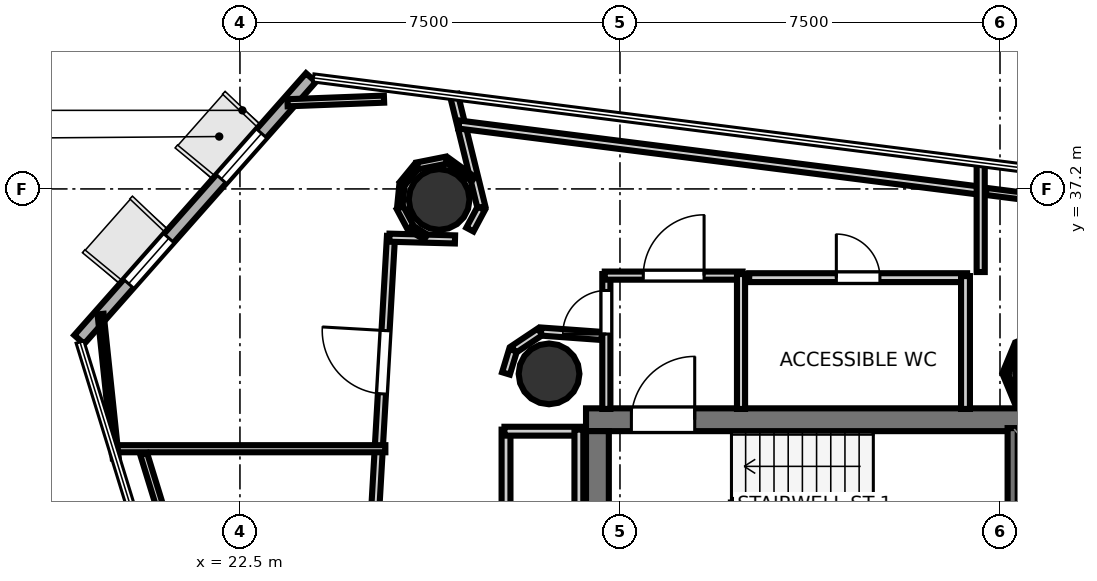
"""IFC4 building model, lengths in metres.
Left out: names, types, materials, properties, quantities, classifications, styles, units other than length and angle.
Written with IfcOpenShell. Run it as: python <this file> out.ifc"""

import sys

from ifc_helpers import new_model, si_unit, direction, frame, frame_2d, origin, origin_2d, place, context, subcontext, project, spatial, rectangle, hollow_circle, extrude, element, fill, save


model = new_model("IFC4")
c1 = context("Model", 3, precision=1e-05, world=origin(), true_north=direction((0.0, 1.0)))
c2 = subcontext(c1, "Body", "Model", "MODEL_VIEW")
j1 = project(units=[si_unit("LENGTHUNIT", "METRE"), si_unit("PLANEANGLEUNIT", "RADIAN")], contexts=[c1])
p1 = place(None, origin())
s1 = spatial("IfcSite", under=j1, at=p1, CompositionType="ELEMENT")
p2 = place(p1, origin())
s2 = spatial("IfcBuilding", under=s1, at=p2, CompositionType="ELEMENT")
p3 = place(p2, frame((0.0, 0.0, 218.8)))
s3 = spatial("IfcBuildingStorey", under=s2, at=p3, CompositionType="ELEMENT", Elevation=218.8)
p4 = place(p3, frame((29.33, 32.645, 0.0), z_axis=(0.0, 0.0, 1.0), x_axis=(1.0, 0.0, 0.0)))
e1 = element("IfcWall", 1, at=p4, inside=s3, PredefinedType="SHEAR", context=c2, shape_type="SweptSolid", body=[
    extrude(rectangle(XDim=10.52, YDim=0.45, at=frame_2d((5.26, 0.0))), origin(), (0.0, 0.0, 1.0), 3.52),
])
p5 = place(p4, frame((0.895, 0.0, 0.0)))
e2 = element("IfcOpeningElement", 2, at=p5, cuts=e1, PredefinedType="OPENING", context=c2, shape_type="SweptSolid", body=[
    extrude(rectangle(XDim=1.25, YDim=2.15, at=frame_2d((0.625, 1.075))), frame((0.0, 0.235, 0.0), z_axis=(0.0, -1.0, 0.0), x_axis=(1.0, 0.0, 0.0)), (0.0, 0.0, 1.0), 0.47),
])
p6 = place(p3, frame((29.555, 24.98, 0.0), z_axis=(0.0, 0.0, 1.0), x_axis=(0.0, 1.0, 0.0)))
e3 = element("IfcWall", 3, at=p6, inside=s3, PredefinedType="SHEAR", context=c2, shape_type="SweptSolid", body=[
    extrude(rectangle(XDim=7.44, YDim=0.45, at=frame_2d((3.72, 0.0))), origin(), (0.0, 0.0, 1.0), 3.52),
])
for number, where, z_axis, x_axis in (
    (4, (28.6, 33.55, 0.0), (0.0, 0.0, 1.0), (1.0, 0.0, 0.0)),
    (5, (38.4, 33.55, 0.0), (0.0, 0.0, 1.0), (1.0, 0.0, 0.0)),
    (6, (26.431, 36.992, 0.0), (0.0, 0.0, 1.0), (1.0, 0.0, 0.0)),
):
    element("IfcColumn", number, at=place(p3, frame(where, z_axis=z_axis, x_axis=x_axis)), inside=s3, PredefinedType="COLUMN", context=c2, shape_type="SweptSolid", body=[
        extrude(hollow_circle(Radius=0.6, WallThickness=0.03, at=origin_2d()), origin(), (0.0, 0.0, 1.0), 3.7),
    ])
p7 = place(p3, frame((23.901, 39.397, 0.0), z_axis=(0.0, 0.0, 1.0), x_axis=(-0.66253953577, -0.74902694447, 0.0)))
e7 = element("IfcWall", 7, at=p7, inside=s3, PredefinedType="SOLIDWALL", context=c2, shape_type="SweptSolid", body=[
    extrude(rectangle(XDim=6.902, YDim=0.26, at=frame_2d((3.451, 0.0))), origin(), (0.0, 0.0, 1.0), 3.52),
])
p8 = place(p7, frame((1.471, 0.0, 0.9)))
e8 = element("IfcOpeningElement", 8, at=p8, cuts=e7, PredefinedType="OPENING", context=c2, shape_type="SweptSolid", body=[
    extrude(rectangle(XDim=1.2, YDim=2.0, at=frame_2d((0.6, 1.0))), frame((0.0, 0.14, 0.0), z_axis=(0.0, -1.0, 0.0), x_axis=(1.0, 0.0, 0.0)), (0.0, 0.0, 1.0), 0.28),
])
p9 = place(p7, frame((4.231, 0.0, 0.9)))
e9 = element("IfcOpeningElement", 9, at=p9, cuts=e7, PredefinedType="OPENING", context=c2, shape_type="SweptSolid", body=[
    extrude(rectangle(XDim=1.2, YDim=2.0, at=frame_2d((0.6, 1.0))), frame((0.0, 0.14, 0.0), z_axis=(0.0, -1.0, 0.0), x_axis=(1.0, 0.0, 0.0)), (0.0, 0.0, 1.0), 0.28),
])
p10 = place(p3, frame((37.75, 30.12, 0.0), z_axis=(0.0, 0.0, 1.0), x_axis=(0.0, 1.0, 0.0)))
e10 = element("IfcWall", 10, at=p10, inside=s3, PredefinedType="SOLIDWALL", context=c2, shape_type="SweptSolid", body=[
    extrude(rectangle(XDim=2.36, YDim=0.2, at=frame_2d((1.18, 0.0))), origin(), (0.0, 0.0, 1.0), 3.52),
])
p11 = place(p3, frame((29.731, 32.858, 0.0), z_axis=(0.0, 0.0, 1.0), x_axis=(0.0, 1.0, 0.0)))
e11 = element("IfcWall", 11, at=p11, inside=s3, PredefinedType="PARTITIONING", context=c2, shape_type="SweptSolid", body=[
    extrude(rectangle(XDim=2.662, YDim=0.16, at=frame_2d((1.331, 0.0))), origin(), (0.0, 0.0, 1.0), 2.84),
])
p12 = place(p11, frame((1.478, 0.0, 0.0)))
e12 = element("IfcOpeningElement", 12, at=p12, cuts=e11, PredefinedType="OPENING", context=c2, shape_type="SweptSolid", body=[
    extrude(rectangle(XDim=0.86, YDim=2.05, at=frame_2d((0.43, 1.025))), frame((0.0, 0.09, 0.0), z_axis=(0.0, -1.0, 0.0), x_axis=(1.0, 0.0, 0.0)), (0.0, 0.0, 1.0), 0.18),
])
p13 = place(p3, frame((29.7, 35.489, 0.0), z_axis=(0.0, 0.0, 1.0), x_axis=(1.0, 0.0, 0.0)))
e13 = element("IfcWall", 13, at=p13, inside=s3, PredefinedType="PARTITIONING", context=c2, shape_type="SweptSolid", body=[
    extrude(rectangle(XDim=2.72, YDim=0.16, at=frame_2d((1.36, 0.0))), origin(), (0.0, 0.0, 1.0), 2.84),
])
p14 = place(p13, frame((0.76, 0.0, 0.0)))
e14 = element("IfcOpeningElement", 14, at=p14, cuts=e13, PredefinedType="OPENING", context=c2, shape_type="SweptSolid", body=[
    extrude(rectangle(XDim=1.2, YDim=2.15, at=frame_2d((0.6, 1.075))), frame((0.0, 0.09, 0.0), z_axis=(0.0, -1.0, 0.0), x_axis=(1.0, 0.0, 0.0)), (0.0, 0.0, 1.0), 0.18),
])
p15 = place(p3, frame((32.389, 35.52, 0.0), z_axis=(0.0, 0.0, 1.0), x_axis=(0.0, -1.0, 0.0)))
e15 = element("IfcWall", 15, at=p15, inside=s3, PredefinedType="PARTITIONING", context=c2, shape_type="SweptSolid", body=[
    extrude(rectangle(XDim=2.662, YDim=0.16, at=frame_2d((1.331, 0.0))), origin(), (0.0, 0.0, 1.0), 2.84),
])
p16 = place(p3, frame((32.55, 35.449, 0.0), z_axis=(0.0, 0.0, 1.0), x_axis=(1.0, 0.0, 0.0)))
e16 = element("IfcWall", 16, at=p16, inside=s3, PredefinedType="PLUMBINGWALL", context=c2, shape_type="SweptSolid", body=[
    extrude(rectangle(XDim=4.3, YDim=0.175, at=frame_2d((2.15, 0.0))), origin(), (0.0, 0.0, 1.0), 2.84),
])
p17 = place(p16, frame((1.72, 0.0, 0.0)))
e17 = element("IfcOpeningElement", 17, at=p17, cuts=e16, PredefinedType="OPENING", context=c2, shape_type="SweptSolid", body=[
    extrude(rectangle(XDim=0.86, YDim=2.05, at=frame_2d((0.43, 1.025))), frame((0.0, 0.097, 0.0), z_axis=(0.0, -1.0, 0.0), x_axis=(1.0, 0.0, 0.0)), (0.0, 0.0, 1.0), 0.195),
])
p18 = place(p3, frame((36.819, 35.48, 0.0), z_axis=(0.0, 0.0, 1.0), x_axis=(0.0, -1.0, 0.0)))
e18 = element("IfcWall", 18, at=p18, inside=s3, PredefinedType="PLUMBINGWALL", context=c2, shape_type="SweptSolid", body=[
    extrude(rectangle(XDim=2.622, YDim=0.175, at=frame_2d((1.311, 0.0))), origin(), (0.0, 0.0, 1.0), 2.84),
])
p19 = place(p3, frame((27.751, 28.48, 0.0), z_axis=(0.0, 0.0, 1.0), x_axis=(0.0, 1.0, 0.0)))
e19 = element("IfcWall", 19, at=p19, inside=s3, PredefinedType="PLUMBINGWALL", context=c2, shape_type="SweptSolid", body=[
    extrude(rectangle(XDim=3.97, YDim=0.175, at=frame_2d((1.985, 0.0))), origin(), (0.0, 0.0, 1.0), 2.84),
])
p20 = place(p19, frame((1.555, 0.0, 0.0)))
e20 = element("IfcOpeningElement", 20, at=p20, cuts=e19, PredefinedType="OPENING", context=c2, shape_type="SweptSolid", body=[
    extrude(rectangle(XDim=0.86, YDim=2.05, at=frame_2d((0.43, 1.025))), frame((0.0, 0.097, 0.0), z_axis=(0.0, -1.0, 0.0), x_axis=(1.0, 0.0, 0.0)), (0.0, 0.0, 1.0), 0.195),
])
p21 = place(p3, frame((27.72, 32.419, 0.0), z_axis=(0.0, 0.0, 1.0), x_axis=(1.0, 0.0, 0.0)))
e21 = element("IfcWall", 21, at=p21, inside=s3, PredefinedType="PLUMBINGWALL", context=c2, shape_type="SweptSolid", body=[
    extrude(rectangle(XDim=1.5, YDim=0.175, at=frame_2d((0.75, 0.0))), origin(), (0.0, 0.0, 1.0), 2.84),
])
p22 = place(p3, frame((29.189, 32.45, 0.0), z_axis=(0.0, 0.0, 1.0), x_axis=(0.0, -1.0, 0.0)))
e22 = element("IfcWall", 22, at=p22, inside=s3, PredefinedType="PLUMBINGWALL", context=c2, shape_type="SweptSolid", body=[
    extrude(rectangle(XDim=3.97, YDim=0.175, at=frame_2d((1.985, 0.0))), origin(), (0.0, 0.0, 1.0), 2.84),
])
p23 = place(p3, frame((27.265, 36.839, 0.0), z_axis=(0.0, 0.0, 1.0), x_axis=(-0.238232940633, 0.971208044652, 0.0)))
e23 = element("IfcWall", 23, at=p23, inside=s3, PredefinedType="PARTITIONING", context=c2, shape_type="SweptSolid", body=[
    extrude(rectangle(XDim=2.284, YDim=0.16, at=frame_2d((1.142, 0.0))), origin(), (0.0, 0.0, 1.0), 2.84),
])
p24 = place(p3, frame((26.822, 38.471, 0.0), z_axis=(0.0, 0.0, 1.0), x_axis=(0.992041870869, -0.12590840497, 0.0)))
e24 = element("IfcWall", 24, at=p24, inside=s3, PredefinedType="PARTITIONING", context=c2, shape_type="SweptSolid", body=[
    extrude(rectangle(XDim=10.407, YDim=0.16, at=frame_2d((5.203, 0.0))), origin(), (0.0, 0.0, 1.0), 2.84),
])
p25 = place(p3, frame((37.119, 37.74, 0.0), z_axis=(0.0, 0.0, 1.0), x_axis=(0.0, -1.0, 0.0)))
e25 = element("IfcWall", 25, at=p25, inside=s3, PredefinedType="PARTITIONING", context=c2, shape_type="SweptSolid", body=[
    extrude(rectangle(XDim=2.179, YDim=0.16, at=frame_2d((1.09, 0.0))), origin(), (0.0, 0.0, 1.0), 2.84),
])
p26 = place(p3, frame((29.64, 34.299, 0.0), z_axis=(0.0, 0.0, 1.0), x_axis=(-0.997392224386, 0.072171675429, 0.0)))
e26 = element("IfcWall", 26, at=p26, inside=s3, PredefinedType="PARTITIONING", context=c2, shape_type="SweptSolid", body=[
    extrude(rectangle(XDim=1.201, YDim=0.16, at=frame_2d((0.601, 0.0))), origin(), (0.0, 0.0, 1.0), 2.84),
])
p27 = place(p3, frame((28.423, 34.38, 0.0), z_axis=(0.0, 0.0, 1.0), x_axis=(-0.831571279003, -0.555418047903, 0.0)))
e27 = element("IfcWall", 27, at=p27, inside=s3, PredefinedType="PARTITIONING", context=c2, shape_type="SweptSolid", body=[
    extrude(rectangle(XDim=0.628, YDim=0.16, at=frame_2d((0.314, 0.0))), origin(), (0.0, 0.0, 1.0), 2.84),
])
p28 = place(p3, frame((27.888, 34.015, 0.0), z_axis=(0.0, 0.0, 1.0), x_axis=(-0.290263585829, -0.956946733492, 0.0)))
e28 = element("IfcWall", 28, at=p28, inside=s3, PredefinedType="PARTITIONING", context=c2, shape_type="SweptSolid", body=[
    extrude(rectangle(XDim=0.476, YDim=0.16, at=frame_2d((0.238, 0.0))), origin(), (0.0, 0.0, 1.0), 2.84),
])
p29 = place(p3, frame((24.413, 17.721, 0.0), z_axis=(0.0, 0.0, 1.0), x_axis=(0.057505607696, 0.998345183333, 0.0)))
e29 = element("IfcWall", 29, at=p29, inside=s3, PredefinedType="PARTITIONING", context=c2, shape_type="SweptSolid", body=[
    extrude(rectangle(XDim=18.578, YDim=0.16, at=frame_2d((9.289, 0.0))), origin(), (0.0, 0.0, 1.0), 2.84),
])
p30 = place(p29, frame((15.461, 0.0, 0.0)))
e30 = element("IfcOpeningElement", 30, at=p30, cuts=e29, PredefinedType="OPENING", context=c2, shape_type="SweptSolid", body=[
    extrude(rectangle(XDim=1.25, YDim=2.2, at=frame_2d((0.625, 1.1))), frame((0.0, 0.09, 0.0), z_axis=(0.0, -1.0, 0.0), x_axis=(1.0, 0.0, 0.0)), (0.0, 0.0, 1.0), 0.18),
])
p31 = place(p29, frame((12.002, 0.0, 0.0)))
e31 = element("IfcOpeningElement", 31, at=p31, cuts=e29, PredefinedType="OPENING", context=c2, shape_type="SweptSolid", body=[
    extrude(rectangle(XDim=1.25, YDim=2.2, at=frame_2d((0.625, 1.1))), frame((0.0, 0.09, 0.0), z_axis=(0.0, -1.0, 0.0), x_axis=(1.0, 0.0, 0.0)), (0.0, 0.0, 1.0), 0.18),
])
p32 = place(p3, frame((25.449, 36.238, 0.0), z_axis=(0.0, 0.0, 1.0), x_axis=(0.999651698073, -0.026390955635, 0.0)))
e32 = element("IfcWall", 32, at=p32, inside=s3, PredefinedType="PARTITIONING", context=c2, shape_type="SweptSolid", body=[
    extrude(rectangle(XDim=1.295, YDim=0.16, at=frame_2d((0.647, 0.0))), origin(), (0.0, 0.0, 1.0), 2.84),
])
p33 = place(p3, frame((27.038, 36.398, 0.0), z_axis=(0.0, 0.0, 1.0), x_axis=(0.471865548338, 0.881670519123, 0.0)))
e33 = element("IfcWall", 33, at=p33, inside=s3, PredefinedType="PARTITIONING", context=c2, shape_type="SweptSolid", body=[
    extrude(rectangle(XDim=0.476, YDim=0.16, at=frame_2d((0.238, 0.0))), origin(), (0.0, 0.0, 1.0), 2.84),
])
p34 = place(p3, frame((38.388, 34.339, 0.0), z_axis=(0.0, 0.0, 1.0), x_axis=(-0.923894108428, -0.382648241093, 0.0)))
e34 = element("IfcWall", 34, at=p34, inside=s3, PredefinedType="PARTITIONING", context=c2, shape_type="SweptSolid", body=[
    extrude(rectangle(XDim=0.582, YDim=0.14, at=frame_2d((0.291, 0.0))), origin(), (0.0, 0.0, 1.0), 2.84),
])
p35 = place(p3, frame((37.834, 34.099, 0.0), z_axis=(0.0, 0.0, 1.0), x_axis=(-0.382796622927, -0.923832639322, 0.0)))
e35 = element("IfcWall", 35, at=p35, inside=s3, PredefinedType="PARTITIONING", context=c2, shape_type="SweptSolid", body=[
    extrude(rectangle(XDim=0.582, YDim=0.12, at=frame_2d((0.291, 0.0))), origin(), (0.0, 0.0, 1.0), 2.84),
])
p36 = place(p3, frame((37.611, 33.538, 0.0), z_axis=(0.0, 0.0, 1.0), x_axis=(0.382796622927, -0.923832639322, 0.0)))
e36 = element("IfcWall", 36, at=p36, inside=s3, PredefinedType="PARTITIONING", context=c2, shape_type="SweptSolid", body=[
    extrude(rectangle(XDim=0.582, YDim=0.105, at=frame_2d((0.291, 0.0))), origin(), (0.0, 0.0, 1.0), 2.84),
])
p37 = place(p3, frame((37.851, 32.984, 0.0), z_axis=(0.0, 0.0, 1.0), x_axis=(0.924628481531, -0.380870281252, 0.0)))
e37 = element("IfcWall", 37, at=p37, inside=s3, PredefinedType="PARTITIONING", context=c2, shape_type="SweptSolid", body=[
    extrude(rectangle(XDim=0.102, YDim=0.14, at=frame_2d((0.051, 0.0))), origin(), (0.0, 0.0, 1.0), 2.84),
])
p38 = place(p3, frame((37.226, 37.15, 0.0), z_axis=(0.0, 0.0, 1.0), x_axis=(0.992042774502, -0.125901284976, 0.0)))
e38 = element("IfcWall", 38, at=p38, inside=s3, PredefinedType="PARTITIONING", context=c2, shape_type="SweptSolid", body=[
    extrude(rectangle(XDim=8.885, YDim=0.14, at=frame_2d((4.443, 0.0))), origin(), (0.0, 0.0, 1.0), 2.84),
])
p39 = place(p3, frame((27.105, 37.394, 0.0), z_axis=(0.0, 0.0, 1.0), x_axis=(-0.809610443394, 0.586967571461, 0.0)))
e39 = element("IfcWall", 39, at=p39, inside=s3, PredefinedType="PARTITIONING", context=c2, shape_type="SweptSolid", body=[
    extrude(rectangle(XDim=0.627, YDim=0.105, at=frame_2d((0.313, 0.0))), origin(), (0.0, 0.0, 1.0), 2.84),
])
p40 = place(p3, frame((26.573, 37.768, 0.0), z_axis=(0.0, 0.0, 1.0), x_axis=(-0.980773892286, -0.195147565217, 0.0)))
e40 = element("IfcWall", 40, at=p40, inside=s3, PredefinedType="PARTITIONING", context=c2, shape_type="SweptSolid", body=[
    extrude(rectangle(XDim=0.582, YDim=0.14, at=frame_2d((0.291, 0.0))), origin(), (0.0, 0.0, 1.0), 2.84),
])
p41 = place(p3, frame((25.985, 37.644, 0.0), z_axis=(0.0, 0.0, 1.0), x_axis=(-0.634562438402, -0.772871601088, 0.0)))
e41 = element("IfcWall", 41, at=p41, inside=s3, PredefinedType="PARTITIONING", context=c2, shape_type="SweptSolid", body=[
    extrude(rectangle(XDim=0.441, YDim=0.12, at=frame_2d((0.221, 0.0))), origin(), (0.0, 0.0, 1.0), 2.84),
])
p42 = place(p3, frame((25.698, 37.286, 0.0), z_axis=(0.0, 0.0, 1.0), x_axis=(-0.097915215421, -0.995194760129, 0.0)))
e42 = element("IfcWall", 42, at=p42, inside=s3, PredefinedType="PARTITIONING", context=c2, shape_type="SweptSolid", body=[
    extrude(rectangle(XDim=0.441, YDim=0.105, at=frame_2d((0.221, 0.0))), origin(), (0.0, 0.0, 1.0), 2.84),
])
p43 = place(p3, frame((25.658, 36.829, 0.0), z_axis=(0.0, 0.0, 1.0), x_axis=(0.471392110461, -0.881923737177, 0.0)))
e43 = element("IfcWall", 43, at=p43, inside=s3, PredefinedType="PARTITIONING", context=c2, shape_type="SweptSolid", body=[
    extrude(rectangle(XDim=0.441, YDim=0.14, at=frame_2d((0.221, 0.0))), origin(), (0.0, 0.0, 1.0), 2.84),
])
p44 = place(p3, frame((25.877, 36.428, 0.0), z_axis=(0.0, 0.0, 1.0), x_axis=(0.852322728649, -0.523016219853, 0.0)))
e44 = element("IfcWall", 44, at=p44, inside=s3, PredefinedType="PARTITIONING", context=c2, shape_type="SweptSolid", body=[
    extrude(rectangle(XDim=0.34, YDim=0.12, at=frame_2d((0.17, 0.0))), origin(), (0.0, 0.0, 1.0), 2.84),
])
p45 = place(p3, frame((25.37, 32.073, 0.0), z_axis=(0.0, 0.0, 1.0), x_axis=(-1.0, 0.0, 0.0)))
e45 = element("IfcWall", 45, at=p45, inside=s3, PredefinedType="PARTITIONING", context=c2, shape_type="SweptSolid", body=[
    extrude(rectangle(XDim=5.398, YDim=0.14, at=frame_2d((2.699, 0.0))), origin(), (0.0, 0.0, 1.0), 2.84),
])
p46 = place(p3, frame((20.048, 31.889, 0.0), z_axis=(0.0, 0.0, 1.0), x_axis=(-0.104435651057, 0.994531645946, 0.0)))
e46 = element("IfcWall", 46, at=p46, inside=s3, PredefinedType="PARTITIONING", context=c2, shape_type="SweptSolid", body=[
    extrude(rectangle(XDim=2.857, YDim=0.12, at=frame_2d((1.428, 0.0))), origin(), (0.0, 0.0, 1.0), 2.84),
])
p47 = place(p3, frame((23.439, 38.9, 0.0), z_axis=(0.0, 0.0, 1.0), x_axis=(0.999290219192, 0.037670383952, 0.0)))
e47 = element("IfcWall", 47, at=p47, inside=s3, PredefinedType="PARTITIONING", context=c2, shape_type="SweptSolid", body=[
    extrude(rectangle(XDim=1.906, YDim=0.14, at=frame_2d((0.953, 0.0))), origin(), (0.0, 0.0, 1.0), 2.84),
])
p48 = place(p3, frame((22.639, 25.351, 0.0), z_axis=(0.0, 0.0, 1.0), x_axis=(-0.29437082852, 0.955691276154, 0.0)))
e48 = element("IfcWall", 48, at=p48, inside=s3, PredefinedType="PARTITIONING", context=c2, shape_type="SweptSolid", body=[
    extrude(rectangle(XDim=6.923, YDim=0.14, at=frame_2d((3.461, 0.0))), origin(), (0.0, 0.0, 1.0), 2.84),
])
p49 = place(p5, origin())
e49 = element("IfcDoor", 49, at=p49, inside=s3, OperationType="SINGLE_SWING_RIGHT", PredefinedType="DOOR", context=c2, shape_type="SweptSolid", body=[
    extrude(rectangle(XDim=1.25, YDim=2.15, at=frame_2d((0.625, 1.075))), frame((0.0, 0.025, 0.0), z_axis=(0.0, -1.0, 0.0), x_axis=(1.0, 0.0, 0.0)), (0.0, 0.0, 1.0), 0.05),
])
fill(e2, e49)
p50 = place(p14, origin())
e50 = element("IfcDoor", 50, at=p50, inside=s3, OperationType="SINGLE_SWING_RIGHT", PredefinedType="DOOR", context=c2, shape_type="SweptSolid", body=[
    extrude(rectangle(XDim=1.2, YDim=2.15, at=frame_2d((0.6, 1.075))), frame((0.0, 0.025, 0.0), z_axis=(0.0, -1.0, 0.0), x_axis=(1.0, 0.0, 0.0)), (0.0, 0.0, 1.0), 0.05),
])
fill(e14, e50)
p51 = place(p17, origin())
e51 = element("IfcDoor", 51, at=p51, inside=s3, OperationType="SINGLE_SWING_LEFT", PredefinedType="DOOR", context=c2, shape_type="SweptSolid", body=[
    extrude(rectangle(XDim=0.86, YDim=2.05, at=frame_2d((0.43, 1.025))), frame((0.0, 0.025, 0.0), z_axis=(0.0, -1.0, 0.0), x_axis=(1.0, 0.0, 0.0)), (0.0, 0.0, 1.0), 0.05),
])
fill(e17, e51)
p52 = place(p12, origin())
e52 = element("IfcDoor", 52, at=p52, inside=s3, OperationType="SINGLE_SWING_LEFT", PredefinedType="DOOR", context=c2, shape_type="SweptSolid", body=[
    extrude(rectangle(XDim=0.86, YDim=2.05, at=frame_2d((0.43, 1.025))), frame((0.0, 0.025, 0.0), z_axis=(0.0, -1.0, 0.0), x_axis=(1.0, 0.0, 0.0)), (0.0, 0.0, 1.0), 0.05),
])
fill(e12, e52)
p53 = place(p30, origin())
e53 = element("IfcDoor", 53, at=p53, inside=s3, OperationType="SINGLE_SWING_RIGHT", PredefinedType="DOOR", context=c2, shape_type="SweptSolid", body=[
    extrude(rectangle(XDim=1.25, YDim=2.2, at=frame_2d((0.625, 1.1))), frame((0.0, 0.025, 0.0), z_axis=(0.0, -1.0, 0.0), x_axis=(1.0, 0.0, 0.0)), (0.0, 0.0, 1.0), 0.05),
])
fill(e30, e53)
p54 = place(p8, origin())
e54 = element("IfcWindow", 54, at=p54, inside=s3, PartitioningType="SINGLE_PANEL", PredefinedType="WINDOW", context=c2, shape_type="SweptSolid", body=[
    extrude(rectangle(XDim=1.2, YDim=2.0, at=frame_2d((0.6, 1.0))), frame((0.0, 0.03, 0.0), z_axis=(0.0, -1.0, 0.0), x_axis=(1.0, 0.0, 0.0)), (0.0, 0.0, 1.0), 0.06),
])
fill(e8, e54)
p55 = place(p9, origin())
e55 = element("IfcWindow", 55, at=p55, inside=s3, PartitioningType="SINGLE_PANEL", PredefinedType="WINDOW", context=c2, shape_type="SweptSolid", body=[
    extrude(rectangle(XDim=1.2, YDim=2.0, at=frame_2d((0.6, 1.0))), frame((0.0, 0.03, 0.0), z_axis=(0.0, -1.0, 0.0), x_axis=(1.0, 0.0, 0.0)), (0.0, 0.0, 1.0), 0.06),
])
fill(e9, e55)
save(model, sys.argv[1])
